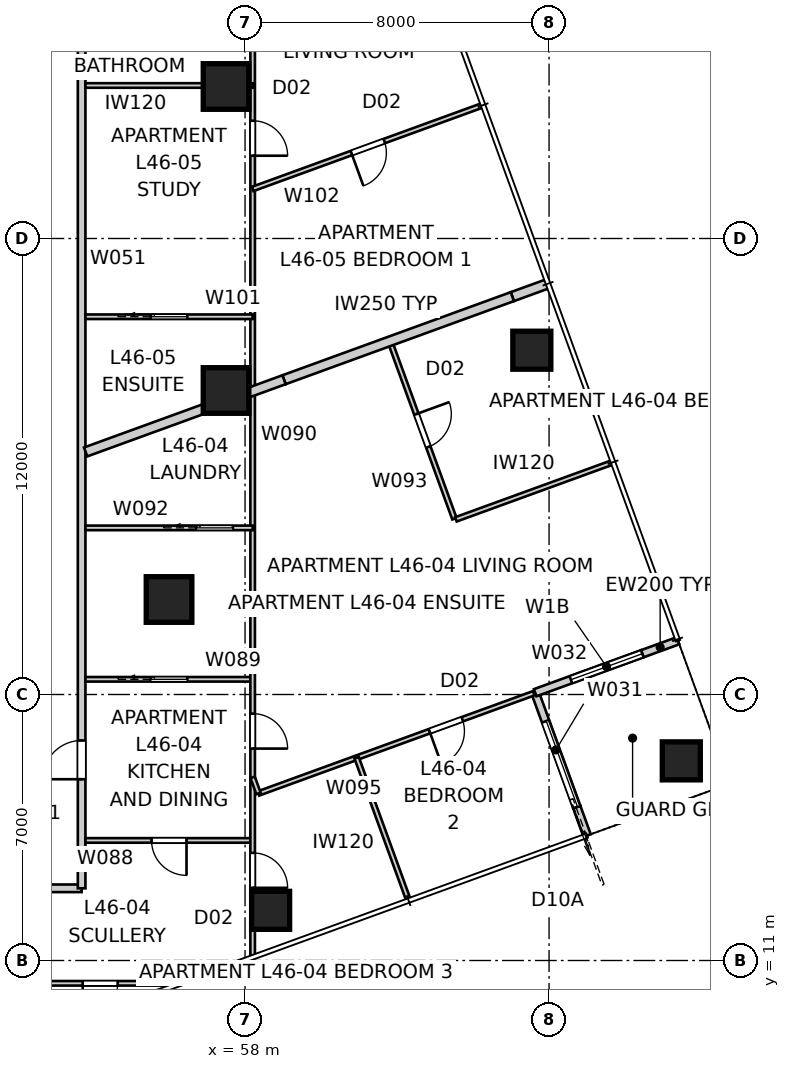
"""IFC4 building model, lengths in metres.
Left out: names, types, materials, properties, quantities, classifications, styles, units other than length and angle.
Written with IfcOpenShell. Run it as: python <this file> out.ifc"""

import sys

from ifc_helpers import new_model, si_unit, direction, frame, frame_2d, origin, origin_2d, place, context, subcontext, project, spatial, rectangle, extrude, element, fill, save


model = new_model("IFC4")
c1 = context("Model", 3, precision=1e-05, world=origin(), true_north=direction((0.0, 1.0)))
c2 = subcontext(c1, "Body", "Model", "MODEL_VIEW")
j1 = project(units=[si_unit("LENGTHUNIT", "METRE"), si_unit("PLANEANGLEUNIT", "RADIAN")], contexts=[c1])
p1 = place(None, origin())
s1 = spatial("IfcSite", under=j1, at=p1, CompositionType="ELEMENT")
p2 = place(p1, origin())
s2 = spatial("IfcBuilding", under=s1, at=p2, CompositionType="ELEMENT")
p3 = place(p2, frame((0.0, 0.0, 167.6)))
s3 = spatial("IfcBuildingStorey", under=s2, at=p3, CompositionType="ELEMENT", Elevation=167.6)
for number, where, z_axis, x_axis in (
    (1, (58.673, 12.32, 0.0), (0.0, 0.0, 1.0), (1.0, 0.0, 0.0)),
    (2, (69.479, 16.253, 0.0), (0.0, 0.0, 1.0), (1.0, 0.0, 0.0)),
    (3, (65.546, 27.06, 0.0), (0.0, 0.0, 1.0), (1.0, 0.0, 0.0)),
):
    element("IfcColumn", number, at=place(p3, frame(where, z_axis=z_axis, x_axis=x_axis)), inside=s3, PredefinedType="COLUMN", context=c2, shape_type="SweptSolid", body=[
        extrude(rectangle(XDim=1.0, YDim=1.0, at=origin_2d()), origin(), (0.0, 0.0, 1.0), 3.2),
    ])
for number, where, z_axis, x_axis in (
    (4, (57.5, 26.0, 0.0), (0.0, 0.0, 1.0), (1.0, 0.0, 0.0)),
    (5, (57.5, 34.0, 0.0), (0.0, 0.0, 1.0), (1.0, 0.0, 0.0)),
    (6, (56.0, 20.5, 0.0), (0.0, 0.0, 1.0), (1.0, 0.0, 0.0)),
):
    element("IfcColumn", number, at=place(p3, frame(where, z_axis=z_axis, x_axis=x_axis)), inside=s3, PredefinedType="COLUMN", context=c2, shape_type="SweptSolid", body=[
        extrude(rectangle(XDim=1.2, YDim=1.2, at=origin_2d()), origin(), (0.0, 0.0, 1.0), 3.4),
    ])
p4 = place(p3, frame((67.002, 14.288, 0.0), z_axis=(0.0, 0.0, 1.0), x_axis=(-0.342110593602, 0.939659694648, 0.0)))
e7 = element("IfcWall", 7, at=p4, inside=s3, PredefinedType="SOLIDWALL", context=c2, shape_type="SweptSolid", body=[
    extrude(rectangle(XDim=0.8, YDim=0.2, at=frame_2d((0.4, 0.0))), origin(), (0.0, 0.0, 1.0), 3.2),
])
p5 = place(p3, frame((66.729, 15.04, 0.0), z_axis=(0.0, 0.0, 1.0), x_axis=(-0.342018703306, 0.939693144909, 0.0)))
e8 = element("IfcWall", 8, at=p5, inside=s3, PredefinedType="SOLIDWALL", context=c2, shape_type="SweptSolid", body=[
    extrude(rectangle(XDim=3.2, YDim=0.2, at=frame_2d((1.6, 0.0))), origin(), (0.0, 0.0, 1.0), 2.588),
])
p6 = place(p5, origin())
e9 = element("IfcOpeningElement", 9, at=p6, cuts=e8, PredefinedType="OPENING", context=c2, shape_type="SweptSolid", body=[
    extrude(rectangle(XDim=2.4, YDim=2.1, at=frame_2d((1.2, 1.05))), frame((0.0, 0.11, 0.0), z_axis=(0.0, -1.0, 0.0), x_axis=(1.0, 0.0, 0.0)), (0.0, 0.0, 1.0), 0.22),
])
p7 = place(p3, frame((65.634, 18.047, 0.0), z_axis=(0.0, 0.0, 1.0), x_axis=(0.939712609717, 0.341965219194, 0.0)))
e10 = element("IfcWall", 10, at=p7, inside=s3, PredefinedType="SOLIDWALL", context=c2, shape_type="SweptSolid", body=[
    extrude(rectangle(XDim=3.0, YDim=0.2, at=frame_2d((1.5, 0.0))), origin(), (0.0, 0.0, 1.0), 2.588),
])
p8 = place(p7, frame((1.0, 0.0, 0.4)))
e11 = element("IfcOpeningElement", 11, at=p8, cuts=e10, PredefinedType="OPENING", context=c2, shape_type="SweptSolid", body=[
    extrude(rectangle(XDim=2.0, YDim=1.8, at=frame_2d((1.0, 0.9))), frame((0.0, 0.11, 0.0), z_axis=(0.0, -1.0, 0.0), x_axis=(1.0, 0.0, 0.0)), (0.0, 0.0, 1.0), 0.22),
])
p9 = place(p3, frame((68.453, 19.073, 0.0), z_axis=(0.0, 0.0, 1.0), x_axis=(0.939686455819, 0.342037080957, 0.0)))
e12 = element("IfcWall", 12, at=p9, inside=s3, PredefinedType="SOLIDWALL", context=c2, shape_type="SweptSolid", body=[
    extrude(rectangle(XDim=1.0, YDim=0.2, at=frame_2d((0.5, 0.0))), origin(), (0.0, 0.0, 1.0), 3.2),
])
p10 = place(p3, frame((46.403, 12.9, 0.0), z_axis=(0.0, 0.0, 1.0), x_axis=(1.0, 0.0, 0.0)))
e13 = element("IfcWall", 13, at=p10, inside=s3, PredefinedType="PARTITIONING", context=c2, shape_type="SweptSolid", body=[
    extrude(rectangle(XDim=7.297, YDim=0.2, at=frame_2d((3.648, 0.0))), origin(), (0.0, 0.0, 1.0), 3.2),
])
p11 = place(p3, frame((53.7, 12.9, 0.0), z_axis=(0.0, 0.0, 1.0), x_axis=(0.0, 1.0, 0.0)))
e14 = element("IfcWall", 14, at=p11, inside=s3, PredefinedType="PARTITIONING", context=c2, shape_type="SweptSolid", body=[
    extrude(rectangle(XDim=33.8, YDim=0.2, at=frame_2d((16.9, 0.0))), origin(), (0.0, 0.0, 1.0), 3.2),
])
p12 = place(p11, frame((29.25, 0.0, 0.0)))
e15 = element("IfcOpeningElement", 15, at=p12, cuts=e14, PredefinedType="OPENING", context=c2, shape_type="SweptSolid", body=[
    extrude(rectangle(XDim=1.02, YDim=2.0, at=frame_2d((0.51, 1.0))), frame((0.0, 0.11, 0.0), z_axis=(0.0, -1.0, 0.0), x_axis=(1.0, 0.0, 0.0)), (0.0, 0.0, 1.0), 0.22),
])
p13 = place(p11, frame((2.87, 0.0, 0.0)))
e16 = element("IfcOpeningElement", 16, at=p13, cuts=e14, PredefinedType="OPENING", context=c2, shape_type="SweptSolid", body=[
    extrude(rectangle(XDim=1.02, YDim=2.34, at=frame_2d((0.51, 1.17))), frame((0.0, 0.11, 0.0), z_axis=(0.0, -1.0, 0.0), x_axis=(1.0, 0.0, 0.0)), (0.0, 0.0, 1.0), 0.22),
])
p14 = place(p3, frame((65.973, 28.812, 0.0), z_axis=(0.0, 0.0, 1.0), x_axis=(-0.939686455819, -0.342037080957, 0.0)))
e17 = element("IfcWall", 17, at=p14, inside=s3, PredefinedType="PARTITIONING", context=c2, shape_type="SweptSolid", body=[
    extrude(rectangle(XDim=1.0, YDim=0.25, at=frame_2d((0.5, 0.0))), origin(), (0.0, 0.0, 1.0), 3.2),
])
p15 = place(p3, frame((65.033, 28.469, 0.0), z_axis=(0.0, 0.0, 1.0), x_axis=(-0.939703072718, -0.341991425514, 0.0)))
e18 = element("IfcWall", 18, at=p15, inside=s3, PredefinedType="PARTITIONING", context=c2, shape_type="SweptSolid", body=[
    extrude(rectangle(XDim=6.393, YDim=0.25, at=frame_2d((3.196, 0.0))), origin(), (0.0, 0.0, 1.0), 2.588),
])
p16 = place(p3, frame((59.026, 26.283, 0.0), z_axis=(0.0, 0.0, 1.0), x_axis=(-0.939680467153, -0.342053533311, 0.0)))
e19 = element("IfcWall", 19, at=p16, inside=s3, PredefinedType="PARTITIONING", context=c2, shape_type="SweptSolid", body=[
    extrude(rectangle(XDim=5.556, YDim=0.25, at=frame_2d((2.778, 0.0))), origin(), (0.0, 0.0, 1.0), 3.2),
])
p17 = place(p3, frame((56.281, 10.4, 0.0), z_axis=(0.0, 0.0, 1.0), x_axis=(-1.0, 0.0, 0.0)))
e20 = element("IfcWall", 20, at=p17, inside=s3, PredefinedType="PARTITIONING", context=c2, shape_type="SweptSolid", body=[
    extrude(rectangle(XDim=34.647, YDim=0.12, at=frame_2d((17.324, 0.0))), origin(), (0.0, 0.0, 1.0), 3.2),
])
p18 = place(p17, frame((29.309, 0.0, 0.0)))
e21 = element("IfcOpeningElement", 21, at=p18, cuts=e20, PredefinedType="OPENING", context=c2, shape_type="SweptSolid", body=[
    extrude(rectangle(XDim=0.92, YDim=2.34, at=frame_2d((0.46, 1.17))), frame((0.0, 0.07, 0.0), z_axis=(0.0, -1.0, 0.0), x_axis=(1.0, 0.0, 0.0)), (0.0, 0.0, 1.0), 0.14),
])
p19 = place(p17, frame((1.632, 0.0, 0.0)))
e22 = element("IfcOpeningElement", 22, at=p19, cuts=e20, PredefinedType="OPENING", context=c2, shape_type="SweptSolid", body=[
    extrude(rectangle(XDim=0.92, YDim=2.1, at=frame_2d((0.46, 1.05))), frame((0.0, 0.07, 0.0), z_axis=(0.0, -1.0, 0.0), x_axis=(1.0, 0.0, 0.0)), (0.0, 0.0, 1.0), 0.14),
])
p20 = place(p17, frame((16.938, 0.0, 0.0)))
e23 = element("IfcOpeningElement", 23, at=p20, cuts=e20, PredefinedType="OPENING", context=c2, shape_type="SweptSolid", body=[
    extrude(rectangle(XDim=0.96, YDim=2.1, at=frame_2d((0.48, 1.05))), frame((0.0, 0.07, 0.0), z_axis=(0.0, -1.0, 0.0), x_axis=(1.0, 0.0, 0.0)), (0.0, 0.0, 1.0), 0.14),
])
p21 = place(p17, frame((11.4, 0.0, 0.0)))
e24 = element("IfcOpeningElement", 24, at=p21, cuts=e20, PredefinedType="OPENING", context=c2, shape_type="SweptSolid", body=[
    extrude(rectangle(XDim=0.96, YDim=2.1, at=frame_2d((0.48, 1.05))), frame((0.0, 0.07, 0.0), z_axis=(0.0, -1.0, 0.0), x_axis=(1.0, 0.0, 0.0)), (0.0, 0.0, 1.0), 0.14),
])
p22 = place(p3, frame((58.2, 14.16, 0.0), z_axis=(0.0, 0.0, 1.0), x_axis=(-1.0, 0.0, 0.0)))
e25 = element("IfcWall", 25, at=p22, inside=s3, PredefinedType="PARTITIONING", context=c2, shape_type="SweptSolid", body=[
    extrude(rectangle(XDim=4.4, YDim=0.12, at=frame_2d((2.2, 0.0))), origin(), (0.0, 0.0, 1.0), 3.2),
])
p23 = place(p22, frame((1.74, 0.0, 0.0)))
e26 = element("IfcOpeningElement", 26, at=p23, cuts=e25, PredefinedType="OPENING", context=c2, shape_type="SweptSolid", body=[
    extrude(rectangle(XDim=0.92, YDim=2.34, at=frame_2d((0.46, 1.17))), frame((0.0, 0.07, 0.0), z_axis=(0.0, -1.0, 0.0), x_axis=(1.0, 0.0, 0.0)), (0.0, 0.0, 1.0), 0.14),
])
p24 = place(p3, frame((53.8, 18.4, 0.0), z_axis=(0.0, 0.0, 1.0), x_axis=(1.0, 0.0, 0.0)))
e27 = element("IfcWall", 27, at=p24, inside=s3, PredefinedType="PARTITIONING", context=c2, shape_type="SweptSolid", body=[
    extrude(rectangle(XDim=4.4, YDim=0.12, at=frame_2d((2.2, 0.0))), origin(), (0.0, 0.0, 1.0), 3.2),
])
p25 = place(p24, frame((1.72, 0.0, 0.0)))
e28 = element("IfcOpeningElement", 28, at=p25, cuts=e27, PredefinedType="OPENING", context=c2, shape_type="SweptSolid", body=[
    extrude(rectangle(XDim=0.96, YDim=2.1, at=frame_2d((0.48, 1.05))), frame((0.0, 0.07, 0.0), z_axis=(0.0, -1.0, 0.0), x_axis=(1.0, 0.0, 0.0)), (0.0, 0.0, 1.0), 0.14),
])
p26 = place(p3, frame((58.2, 47.266, 0.0), z_axis=(0.0, 0.0, 1.0), x_axis=(0.0, -1.0, 0.0)))
e29 = element("IfcWall", 29, at=p26, inside=s3, PredefinedType="PARTITIONING", context=c2, shape_type="SweptSolid", body=[
    extrude(rectangle(XDim=36.14, YDim=0.12, at=frame_2d((18.07, 0.0))), origin(), (0.0, 0.0, 1.0), 3.2),
])
p27 = place(p26, frame((2.227, 0.0, 0.0)))
e30 = element("IfcOpeningElement", 30, at=p27, cuts=e29, PredefinedType="OPENING", context=c2, shape_type="SweptSolid", body=[
    extrude(rectangle(XDim=0.92, YDim=2.34, at=frame_2d((0.46, 1.17))), frame((0.0, 0.07, 0.0), z_axis=(0.0, -1.0, 0.0), x_axis=(1.0, 0.0, 0.0)), (0.0, 0.0, 1.0), 0.14),
])
p28 = place(p26, frame((5.95, 0.0, 0.0)))
e31 = element("IfcOpeningElement", 31, at=p28, cuts=e29, PredefinedType="OPENING", context=c2, shape_type="SweptSolid", body=[
    extrude(rectangle(XDim=0.92, YDim=2.34, at=frame_2d((0.46, 1.17))), frame((0.0, 0.07, 0.0), z_axis=(0.0, -1.0, 0.0), x_axis=(1.0, 0.0, 0.0)), (0.0, 0.0, 1.0), 0.14),
])
p29 = place(p26, frame((29.769, 0.0, 0.0)))
e32 = element("IfcOpeningElement", 32, at=p29, cuts=e29, PredefinedType="OPENING", context=c2, shape_type="SweptSolid", body=[
    extrude(rectangle(XDim=0.92, YDim=2.34, at=frame_2d((0.46, 1.17))), frame((0.0, 0.07, 0.0), z_axis=(0.0, -1.0, 0.0), x_axis=(1.0, 0.0, 0.0)), (0.0, 0.0, 1.0), 0.14),
])
p30 = place(p26, frame((14.168, 0.0, 0.0)))
e33 = element("IfcOpeningElement", 33, at=p30, cuts=e29, PredefinedType="OPENING", context=c2, shape_type="SweptSolid", body=[
    extrude(rectangle(XDim=0.92, YDim=2.34, at=frame_2d((0.46, 1.17))), frame((0.0, 0.07, 0.0), z_axis=(0.0, -1.0, 0.0), x_axis=(1.0, 0.0, 0.0)), (0.0, 0.0, 1.0), 0.14),
])
p31 = place(p26, frame((33.434, 0.0, 0.0)))
e34 = element("IfcOpeningElement", 34, at=p31, cuts=e29, PredefinedType="OPENING", context=c2, shape_type="SweptSolid", body=[
    extrude(rectangle(XDim=0.92, YDim=2.34, at=frame_2d((0.46, 1.17))), frame((0.0, 0.07, 0.0), z_axis=(0.0, -1.0, 0.0), x_axis=(1.0, 0.0, 0.0)), (0.0, 0.0, 1.0), 0.14),
])
p32 = place(p3, frame((53.8, 22.385, 0.0), z_axis=(0.0, 0.0, 1.0), x_axis=(1.0, 0.0, 0.0)))
e35 = element("IfcWall", 35, at=p32, inside=s3, PredefinedType="PARTITIONING", context=c2, shape_type="SweptSolid", body=[
    extrude(rectangle(XDim=4.4, YDim=0.12, at=frame_2d((2.2, 0.0))), origin(), (0.0, 0.0, 1.0), 3.2),
])
p33 = place(p32, frame((2.92, 0.0, 0.0)))
e36 = element("IfcOpeningElement", 36, at=p33, cuts=e35, PredefinedType="OPENING", context=c2, shape_type="SweptSolid", body=[
    extrude(rectangle(XDim=0.96, YDim=2.1, at=frame_2d((0.48, 1.05))), frame((0.0, 0.07, 0.0), z_axis=(0.0, -1.0, 0.0), x_axis=(1.0, 0.0, 0.0)), (0.0, 0.0, 1.0), 0.14),
])
p34 = place(p3, frame((61.82, 27.268, 0.0), z_axis=(0.0, 0.0, 1.0), x_axis=(0.342040652346, -0.93968515586, 0.0)))
e37 = element("IfcWall", 37, at=p34, inside=s3, PredefinedType="PARTITIONING", context=c2, shape_type="SweptSolid", body=[
    extrude(rectangle(XDim=4.94, YDim=0.12, at=frame_2d((2.47, 0.0))), origin(), (0.0, 0.0, 1.0), 3.2),
])
p35 = place(p34, frame((2.01, 0.0, 0.0)))
e38 = element("IfcOpeningElement", 38, at=p35, cuts=e37, PredefinedType="OPENING", context=c2, shape_type="SweptSolid", body=[
    extrude(rectangle(XDim=0.92, YDim=2.34, at=frame_2d((0.46, 1.17))), frame((0.0, 0.07, 0.0), z_axis=(0.0, -1.0, 0.0), x_axis=(1.0, 0.0, 0.0)), (0.0, 0.0, 1.0), 0.14),
])
p36 = place(p3, frame((63.548, 22.608, 0.0), z_axis=(0.0, 0.0, 1.0), x_axis=(0.939688742362, 0.34203079902, 0.0)))
e39 = element("IfcWall", 39, at=p36, inside=s3, PredefinedType="PARTITIONING", context=c2, shape_type="SweptSolid", body=[
    extrude(rectangle(XDim=4.36, YDim=0.12, at=frame_2d((2.18, 0.0))), origin(), (0.0, 0.0, 1.0), 3.2),
])
p37 = place(p3, frame((65.597, 18.033, 0.0), z_axis=(0.0, 0.0, 1.0), x_axis=(-0.939687947615, -0.342032982483, 0.0)))
e40 = element("IfcWall", 40, at=p37, inside=s3, PredefinedType="PARTITIONING", context=c2, shape_type="SweptSolid", body=[
    extrude(rectangle(XDim=7.708, YDim=0.12, at=frame_2d((3.854, 0.0))), origin(), (0.0, 0.0, 1.0), 3.2),
])
p38 = place(p37, frame((2.0, 0.0, 0.0)))
e41 = element("IfcOpeningElement", 41, at=p38, cuts=e40, PredefinedType="OPENING", context=c2, shape_type="SweptSolid", body=[
    extrude(rectangle(XDim=0.92, YDim=2.34, at=frame_2d((0.46, 1.17))), frame((0.0, 0.07, 0.0), z_axis=(0.0, -1.0, 0.0), x_axis=(1.0, 0.0, 0.0)), (0.0, 0.0, 1.0), 0.14),
])
p39 = place(p3, frame((58.354, 15.397, 0.0), z_axis=(0.0, 0.0, 1.0), x_axis=(-0.342309246526, 0.939587345457, 0.0)))
e42 = element("IfcWall", 42, at=p39, inside=s3, PredefinedType="PARTITIONING", context=c2, shape_type="SweptSolid", body=[
    extrude(rectangle(XDim=0.45, YDim=0.12, at=frame_2d((0.225, 0.0))), origin(), (0.0, 0.0, 1.0), 3.2),
])
p40 = place(p3, frame((62.29, 12.615, 0.0), z_axis=(0.0, 0.0, 1.0), x_axis=(-0.342040051101, 0.939685374709, 0.0)))
e43 = element("IfcWall", 43, at=p40, inside=s3, PredefinedType="PARTITIONING", context=c2, shape_type="SweptSolid", body=[
    extrude(rectangle(XDim=3.96, YDim=0.12, at=frame_2d((1.98, 0.0))), origin(), (0.0, 0.0, 1.0), 3.2),
])
p41 = place(p3, frame((58.2, 34.027, 0.0), z_axis=(0.0, 0.0, 1.0), x_axis=(-1.0, 0.0, 0.0)))
e44 = element("IfcWall", 44, at=p41, inside=s3, PredefinedType="PARTITIONING", context=c2, shape_type="SweptSolid", body=[
    extrude(rectangle(XDim=4.4, YDim=0.12, at=frame_2d((2.2, 0.0))), origin(), (0.0, 0.0, 1.0), 3.2),
])
p42 = place(p3, frame((53.8, 27.941, 0.0), z_axis=(0.0, 0.0, 1.0), x_axis=(1.0, 0.0, 0.0)))
e45 = element("IfcWall", 45, at=p42, inside=s3, PredefinedType="PARTITIONING", context=c2, shape_type="SweptSolid", body=[
    extrude(rectangle(XDim=4.4, YDim=0.12, at=frame_2d((2.2, 0.0))), origin(), (0.0, 0.0, 1.0), 3.2),
])
p43 = place(p42, frame((1.72, 0.0, 0.0)))
e46 = element("IfcOpeningElement", 46, at=p43, cuts=e45, PredefinedType="OPENING", context=c2, shape_type="SweptSolid", body=[
    extrude(rectangle(XDim=0.96, YDim=2.1, at=frame_2d((0.48, 1.05))), frame((0.0, 0.07, 0.0), z_axis=(0.0, -1.0, 0.0), x_axis=(1.0, 0.0, 0.0)), (0.0, 0.0, 1.0), 0.14),
])
p44 = place(p3, frame((64.225, 33.496, 0.0), z_axis=(0.0, 0.0, 1.0), x_axis=(-0.939697777766, -0.342005974306, 0.0)))
e47 = element("IfcWall", 47, at=p44, inside=s3, PredefinedType="PARTITIONING", context=c2, shape_type="SweptSolid", body=[
    extrude(rectangle(XDim=6.412, YDim=0.12, at=frame_2d((3.206, 0.0))), origin(), (0.0, 0.0, 1.0), 3.2),
])
p45 = place(p44, frame((2.726, 0.0, 0.0)))
e48 = element("IfcOpeningElement", 48, at=p45, cuts=e47, PredefinedType="OPENING", context=c2, shape_type="SweptSolid", body=[
    extrude(rectangle(XDim=0.92, YDim=2.34, at=frame_2d((0.46, 1.17))), frame((0.0, 0.07, 0.0), z_axis=(0.0, -1.0, 0.0), x_axis=(1.0, 0.0, 0.0)), (0.0, 0.0, 1.0), 0.14),
])
p46 = place(p6, origin())
e49 = element("IfcDoor", 49, at=p46, inside=s3, OperationType="SLIDING_TO_LEFT", PredefinedType="DOOR", context=c2, shape_type="SweptSolid", body=[
    extrude(rectangle(XDim=2.4, YDim=2.1, at=frame_2d((1.2, 1.05))), frame((0.0, 0.025, 0.0), z_axis=(0.0, -1.0, 0.0), x_axis=(1.0, 0.0, 0.0)), (0.0, 0.0, 1.0), 0.05),
])
fill(e9, e49)
p47 = place(p8, origin())
e50 = element("IfcWindow", 50, at=p47, inside=s3, PartitioningType="SINGLE_PANEL", PredefinedType="WINDOW", context=c2, shape_type="SweptSolid", body=[
    extrude(rectangle(XDim=2.0, YDim=1.8, at=frame_2d((1.0, 0.9))), frame((0.0, 0.03, 0.0), z_axis=(0.0, -1.0, 0.0), x_axis=(1.0, 0.0, 0.0)), (0.0, 0.0, 1.0), 0.06),
])
fill(e11, e50)
p48 = place(p13, origin())
e51 = element("IfcDoor", 51, at=p48, inside=s3, OperationType="SINGLE_SWING_LEFT", PredefinedType="DOOR", context=c2, shape_type="SweptSolid", body=[
    extrude(rectangle(XDim=1.02, YDim=2.34, at=frame_2d((0.51, 1.17))), frame((0.0, 0.025, 0.0), z_axis=(0.0, -1.0, 0.0), x_axis=(1.0, 0.0, 0.0)), (0.0, 0.0, 1.0), 0.05),
])
fill(e16, e51)
p49 = place(p23, origin())
e52 = element("IfcDoor", 52, at=p49, inside=s3, OperationType="SINGLE_SWING_LEFT", PredefinedType="DOOR", context=c2, shape_type="SweptSolid", body=[
    extrude(rectangle(XDim=0.92, YDim=2.34, at=frame_2d((0.46, 1.17))), frame((0.0, 0.025, 0.0), z_axis=(0.0, -1.0, 0.0), x_axis=(1.0, 0.0, 0.0)), (0.0, 0.0, 1.0), 0.05),
])
fill(e26, e52)
p50 = place(p25, origin())
e53 = element("IfcDoor", 53, at=p50, inside=s3, OperationType="SLIDING_TO_LEFT", PredefinedType="DOOR", context=c2, shape_type="SweptSolid", body=[
    extrude(rectangle(XDim=0.96, YDim=2.1, at=frame_2d((0.48, 1.05))), frame((0.0, 0.025, 0.0), z_axis=(0.0, -1.0, 0.0), x_axis=(1.0, 0.0, 0.0)), (0.0, 0.0, 1.0), 0.05),
])
fill(e28, e53)
p51 = place(p29, origin())
e54 = element("IfcDoor", 54, at=p51, inside=s3, OperationType="SINGLE_SWING_RIGHT", PredefinedType="DOOR", context=c2, shape_type="SweptSolid", body=[
    extrude(rectangle(XDim=0.92, YDim=2.34, at=frame_2d((0.46, 1.17))), frame((0.0, 0.025, 0.0), z_axis=(0.0, -1.0, 0.0), x_axis=(1.0, 0.0, 0.0)), (0.0, 0.0, 1.0), 0.05),
])
fill(e32, e54)
p52 = place(p45, origin())
e55 = element("IfcDoor", 55, at=p52, inside=s3, OperationType="SINGLE_SWING_RIGHT", PredefinedType="DOOR", context=c2, shape_type="SweptSolid", body=[
    extrude(rectangle(XDim=0.92, YDim=2.34, at=frame_2d((0.46, 1.17))), frame((0.0, 0.025, 0.0), z_axis=(0.0, -1.0, 0.0), x_axis=(1.0, 0.0, 0.0)), (0.0, 0.0, 1.0), 0.05),
])
fill(e48, e55)
p53 = place(p30, origin())
e56 = element("IfcDoor", 56, at=p53, inside=s3, OperationType="SINGLE_SWING_RIGHT", PredefinedType="DOOR", context=c2, shape_type="SweptSolid", body=[
    extrude(rectangle(XDim=0.92, YDim=2.34, at=frame_2d((0.46, 1.17))), frame((0.0, 0.025, 0.0), z_axis=(0.0, -1.0, 0.0), x_axis=(1.0, 0.0, 0.0)), (0.0, 0.0, 1.0), 0.05),
])
fill(e33, e56)
p54 = place(p19, origin())
e57 = element("IfcDoor", 57, at=p54, inside=s3, OperationType="SINGLE_SWING_RIGHT", PredefinedType="DOOR", context=c2, shape_type="SweptSolid", body=[
    extrude(rectangle(XDim=0.92, YDim=2.1, at=frame_2d((0.46, 1.05))), frame((0.0, 0.025, 0.0), z_axis=(0.0, -1.0, 0.0), x_axis=(1.0, 0.0, 0.0)), (0.0, 0.0, 1.0), 0.05),
])
fill(e22, e57)
p55 = place(p31, origin())
e58 = element("IfcDoor", 58, at=p55, inside=s3, OperationType="SINGLE_SWING_RIGHT", PredefinedType="DOOR", context=c2, shape_type="SweptSolid", body=[
    extrude(rectangle(XDim=0.92, YDim=2.34, at=frame_2d((0.46, 1.17))), frame((0.0, 0.025, 0.0), z_axis=(0.0, -1.0, 0.0), x_axis=(1.0, 0.0, 0.0)), (0.0, 0.0, 1.0), 0.05),
])
fill(e34, e58)
p56 = place(p33, origin())
e59 = element("IfcDoor", 59, at=p56, inside=s3, OperationType="SLIDING_TO_LEFT", PredefinedType="DOOR", context=c2, shape_type="SweptSolid", body=[
    extrude(rectangle(XDim=0.96, YDim=2.1, at=frame_2d((0.48, 1.05))), frame((0.0, 0.025, 0.0), z_axis=(0.0, -1.0, 0.0), x_axis=(1.0, 0.0, 0.0)), (0.0, 0.0, 1.0), 0.05),
])
fill(e36, e59)
p57 = place(p38, origin())
e60 = element("IfcDoor", 60, at=p57, inside=s3, OperationType="SINGLE_SWING_RIGHT", PredefinedType="DOOR", context=c2, shape_type="SweptSolid", body=[
    extrude(rectangle(XDim=0.92, YDim=2.34, at=frame_2d((0.46, 1.17))), frame((0.0, 0.025, 0.0), z_axis=(0.0, -1.0, 0.0), x_axis=(1.0, 0.0, 0.0)), (0.0, 0.0, 1.0), 0.05),
])
fill(e41, e60)
p58 = place(p35, origin())
e61 = element("IfcDoor", 61, at=p58, inside=s3, OperationType="SINGLE_SWING_LEFT", PredefinedType="DOOR", context=c2, shape_type="SweptSolid", body=[
    extrude(rectangle(XDim=0.92, YDim=2.34, at=frame_2d((0.46, 1.17))), frame((0.0, 0.025, 0.0), z_axis=(0.0, -1.0, 0.0), x_axis=(1.0, 0.0, 0.0)), (0.0, 0.0, 1.0), 0.05),
])
fill(e38, e61)
p59 = place(p43, origin())
e62 = element("IfcDoor", 62, at=p59, inside=s3, OperationType="SLIDING_TO_LEFT", PredefinedType="DOOR", context=c2, shape_type="SweptSolid", body=[
    extrude(rectangle(XDim=0.96, YDim=2.1, at=frame_2d((0.48, 1.05))), frame((0.0, 0.025, 0.0), z_axis=(0.0, -1.0, 0.0), x_axis=(1.0, 0.0, 0.0)), (0.0, 0.0, 1.0), 0.05),
])
fill(e46, e62)
save(model, sys.argv[1])
